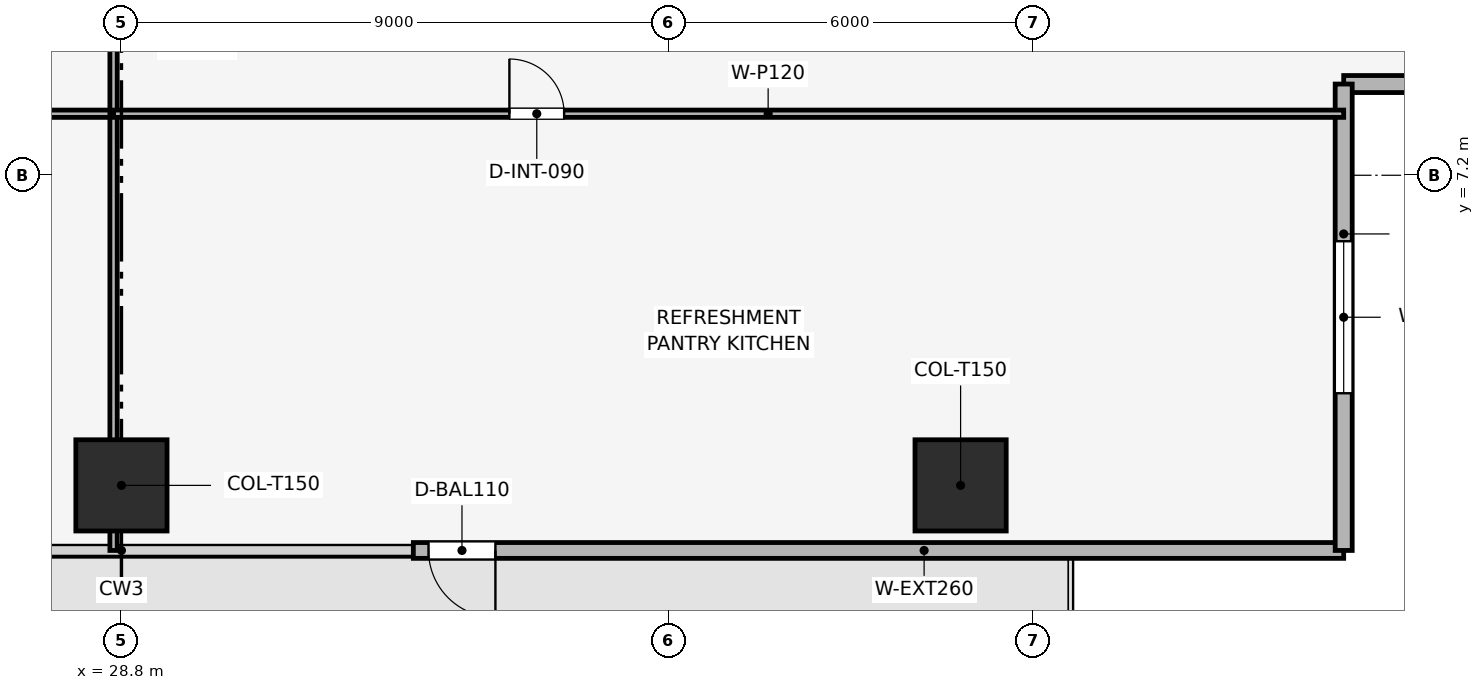
"""IFC4 building model, lengths in metres.
Left out: names, types, materials, properties, quantities, classifications, styles, units other than length and angle.
Written with IfcOpenShell. Run it as: python <this file> out.ifc"""

import sys

from ifc_helpers import new_model, si_unit, direction, frame, frame_2d, origin, origin_2d, place, context, subcontext, project, spatial, rectangle, extrude, element, fill, save


model = new_model("IFC4")
c1 = context("Model", 3, precision=1e-05, world=origin(), true_north=direction((0.0, 1.0)))
c2 = subcontext(c1, "Body", "Model", "MODEL_VIEW")
j1 = project(units=[si_unit("LENGTHUNIT", "METRE"), si_unit("PLANEANGLEUNIT", "RADIAN")], contexts=[c1])
p1 = place(None, origin())
s1 = spatial("IfcSite", under=j1, at=p1, CompositionType="ELEMENT")
p2 = place(p1, origin())
s2 = spatial("IfcBuilding", under=s1, at=p2, CompositionType="ELEMENT")
p3 = place(p2, frame((0.0, 0.0, 33.9)))
s3 = spatial("IfcBuildingStorey", under=s2, at=p3, CompositionType="ELEMENT", Elevation=33.9)
for number, where, z_axis, x_axis in (
    (1, (28.8, 2.1, 0.003), (0.0, 0.0, 1.0), (1.0, 0.0, 0.0)),
    (2, (42.6, 2.1, 0.003), (0.0, 0.0, 1.0), (1.0, 0.0, 0.0)),
):
    element("IfcColumn", number, at=place(p3, frame(where, z_axis=z_axis, x_axis=x_axis)), inside=s3, PredefinedType="COLUMN", context=c2, shape_type="SweptSolid", body=[
        extrude(rectangle(XDim=1.5, YDim=1.5, at=origin_2d()), origin(), (0.0, 0.0, 1.0), 3.644),
    ])
p4 = place(p3, frame((48.9, 1.03, 0.0), z_axis=(0.0, 0.0, 1.0), x_axis=(-1.0, 0.0, 0.0)))
e3 = element("IfcWall", 3, at=p4, inside=s3, PredefinedType="SOLIDWALL", context=c2, shape_type="SweptSolid", body=[
    extrude(rectangle(XDim=15.3, YDim=0.26, at=frame_2d((7.65, 0.0))), origin(), (0.0, 0.0, 1.0), 3.65),
])
p5 = place(p4, frame((13.95, 0.0, 0.0)))
e4 = element("IfcOpeningElement", 4, at=p5, cuts=e3, PredefinedType="OPENING", context=c2, shape_type="SweptSolid", body=[
    extrude(rectangle(XDim=1.1, YDim=2.2, at=frame_2d((0.55, 1.1))), frame((0.0, 0.14, 0.0), z_axis=(0.0, -1.0, 0.0), x_axis=(1.0, 0.0, 0.0)), (0.0, 0.0, 1.0), 0.28),
])
p6 = place(p3, frame((56.57, 8.7, 0.0), z_axis=(0.0, 0.0, 1.0), x_axis=(-1.0, 0.0, 0.0)))
e5 = element("IfcWall", 5, at=p6, inside=s3, PredefinedType="SOLIDWALL", context=c2, shape_type="SweptSolid", body=[
    extrude(rectangle(XDim=7.67, YDim=0.28, at=frame_2d((3.835, 0.0))), origin(), (0.0, 0.0, 1.0), 3.65),
])
p7 = place(p6, frame((2.585, 0.0, 0.9)))
e6 = element("IfcOpeningElement", 6, at=p7, cuts=e5, PredefinedType="OPENING", context=c2, shape_type="SweptSolid", body=[
    extrude(rectangle(XDim=2.5, YDim=1.9, at=frame_2d((1.25, 0.95))), frame((0.0, 0.15, 0.0), z_axis=(0.0, -1.0, 0.0), x_axis=(1.0, 0.0, 0.0)), (0.0, 0.0, 1.0), 0.3),
])
p8 = place(p3, frame((48.9, 8.7, 0.0), z_axis=(0.0, 0.0, 1.0), x_axis=(0.0, -1.0, 0.0)))
e7 = element("IfcWall", 7, at=p8, inside=s3, PredefinedType="SOLIDWALL", context=c2, shape_type="SweptSolid", body=[
    extrude(rectangle(XDim=7.67, YDim=0.28, at=frame_2d((3.835, 0.0))), origin(), (0.0, 0.0, 1.0), 3.65),
])
p9 = place(p8, frame((2.585, 0.0, 0.9)))
e8 = element("IfcOpeningElement", 8, at=p9, cuts=e7, PredefinedType="OPENING", context=c2, shape_type="SweptSolid", body=[
    extrude(rectangle(XDim=2.5, YDim=1.9, at=frame_2d((1.25, 0.95))), frame((0.0, 0.15, 0.0), z_axis=(0.0, -1.0, 0.0), x_axis=(1.0, 0.0, 0.0)), (0.0, 0.0, 1.0), 0.3),
])
p10 = place(p3, frame((19.939, 8.212, 0.0), z_axis=(0.0, 0.0, 1.0), x_axis=(1.0, 0.0, 0.0)))
e9 = element("IfcWall", 9, at=p10, inside=s3, PredefinedType="PARTITIONING", context=c2, shape_type="SweptSolid", body=[
    extrude(rectangle(XDim=8.731, YDim=0.12, at=frame_2d((4.365, 0.0))), origin(), (0.0, 0.0, 1.0), 3.085),
])
p11 = place(p10, frame((1.439, 0.0, 0.0)))
e10 = element("IfcOpeningElement", 10, at=p11, cuts=e9, PredefinedType="OPENING", context=c2, shape_type="SweptSolid", body=[
    extrude(rectangle(XDim=0.9, YDim=2.1, at=frame_2d((0.45, 1.05))), frame((0.0, 0.07, 0.0), z_axis=(0.0, -1.0, 0.0), x_axis=(1.0, 0.0, 0.0)), (0.0, 0.0, 1.0), 0.14),
])
p12 = place(p3, frame((28.67, 1.03, 0.0), z_axis=(0.0, 0.0, 1.0), x_axis=(0.0, 1.0, 0.0)))
e11 = element("IfcWall", 11, at=p12, inside=s3, PredefinedType="PARTITIONING", context=c2, shape_type="SweptSolid", body=[
    extrude(rectangle(XDim=16.57, YDim=0.12, at=frame_2d((8.285, 0.0))), origin(), (0.0, 0.0, 1.0), 3.085),
])
p13 = place(p3, frame((28.67, 8.212, 0.0), z_axis=(0.0, 0.0, 1.0), x_axis=(1.0, 0.0, 0.0)))
e12 = element("IfcWall", 12, at=p13, inside=s3, PredefinedType="PARTITIONING", context=c2, shape_type="SweptSolid", body=[
    extrude(rectangle(XDim=20.23, YDim=0.12, at=frame_2d((10.115, 0.0))), origin(), (0.0, 0.0, 1.0), 2.935),
])
p14 = place(p13, frame((6.51, 0.0, 0.0)))
e13 = element("IfcOpeningElement", 13, at=p14, cuts=e12, PredefinedType="OPENING", context=c2, shape_type="SweptSolid", body=[
    extrude(rectangle(XDim=0.9, YDim=2.1, at=frame_2d((0.45, 1.05))), frame((0.0, 0.07, 0.0), z_axis=(0.0, -1.0, 0.0), x_axis=(1.0, 0.0, 0.0)), (0.0, 0.0, 1.0), 0.14),
])
p15 = place(p5, origin())
e14 = element("IfcDoor", 14, at=p15, inside=s3, OperationType="SINGLE_SWING_LEFT", PredefinedType="DOOR", context=c2, shape_type="SweptSolid", body=[
    extrude(rectangle(XDim=1.1, YDim=2.2, at=frame_2d((0.55, 1.1))), frame((0.0, 0.025, 0.0), z_axis=(0.0, -1.0, 0.0), x_axis=(1.0, 0.0, 0.0)), (0.0, 0.0, 1.0), 0.05),
])
fill(e4, e14)
p16 = place(p9, origin())
e15 = element("IfcWindow", 15, at=p16, inside=s3, PartitioningType="SINGLE_PANEL", PredefinedType="WINDOW", context=c2, shape_type="SweptSolid", body=[
    extrude(rectangle(XDim=2.5, YDim=1.9, at=frame_2d((1.25, 0.95))), frame((0.0, 0.03, 0.0), z_axis=(0.0, -1.0, 0.0), x_axis=(1.0, 0.0, 0.0)), (0.0, 0.0, 1.0), 0.06),
])
fill(e8, e15)
p17 = place(p14, origin())
e16 = element("IfcDoor", 16, at=p17, inside=s3, OperationType="SINGLE_SWING_LEFT", PredefinedType="DOOR", context=c2, shape_type="SweptSolid", body=[
    extrude(rectangle(XDim=0.9, YDim=2.1, at=frame_2d((0.45, 1.05))), frame((0.0, 0.025, 0.0), z_axis=(0.0, -1.0, 0.0), x_axis=(1.0, 0.0, 0.0)), (0.0, 0.0, 1.0), 0.05),
])
fill(e13, e16)
save(model, sys.argv[1])
